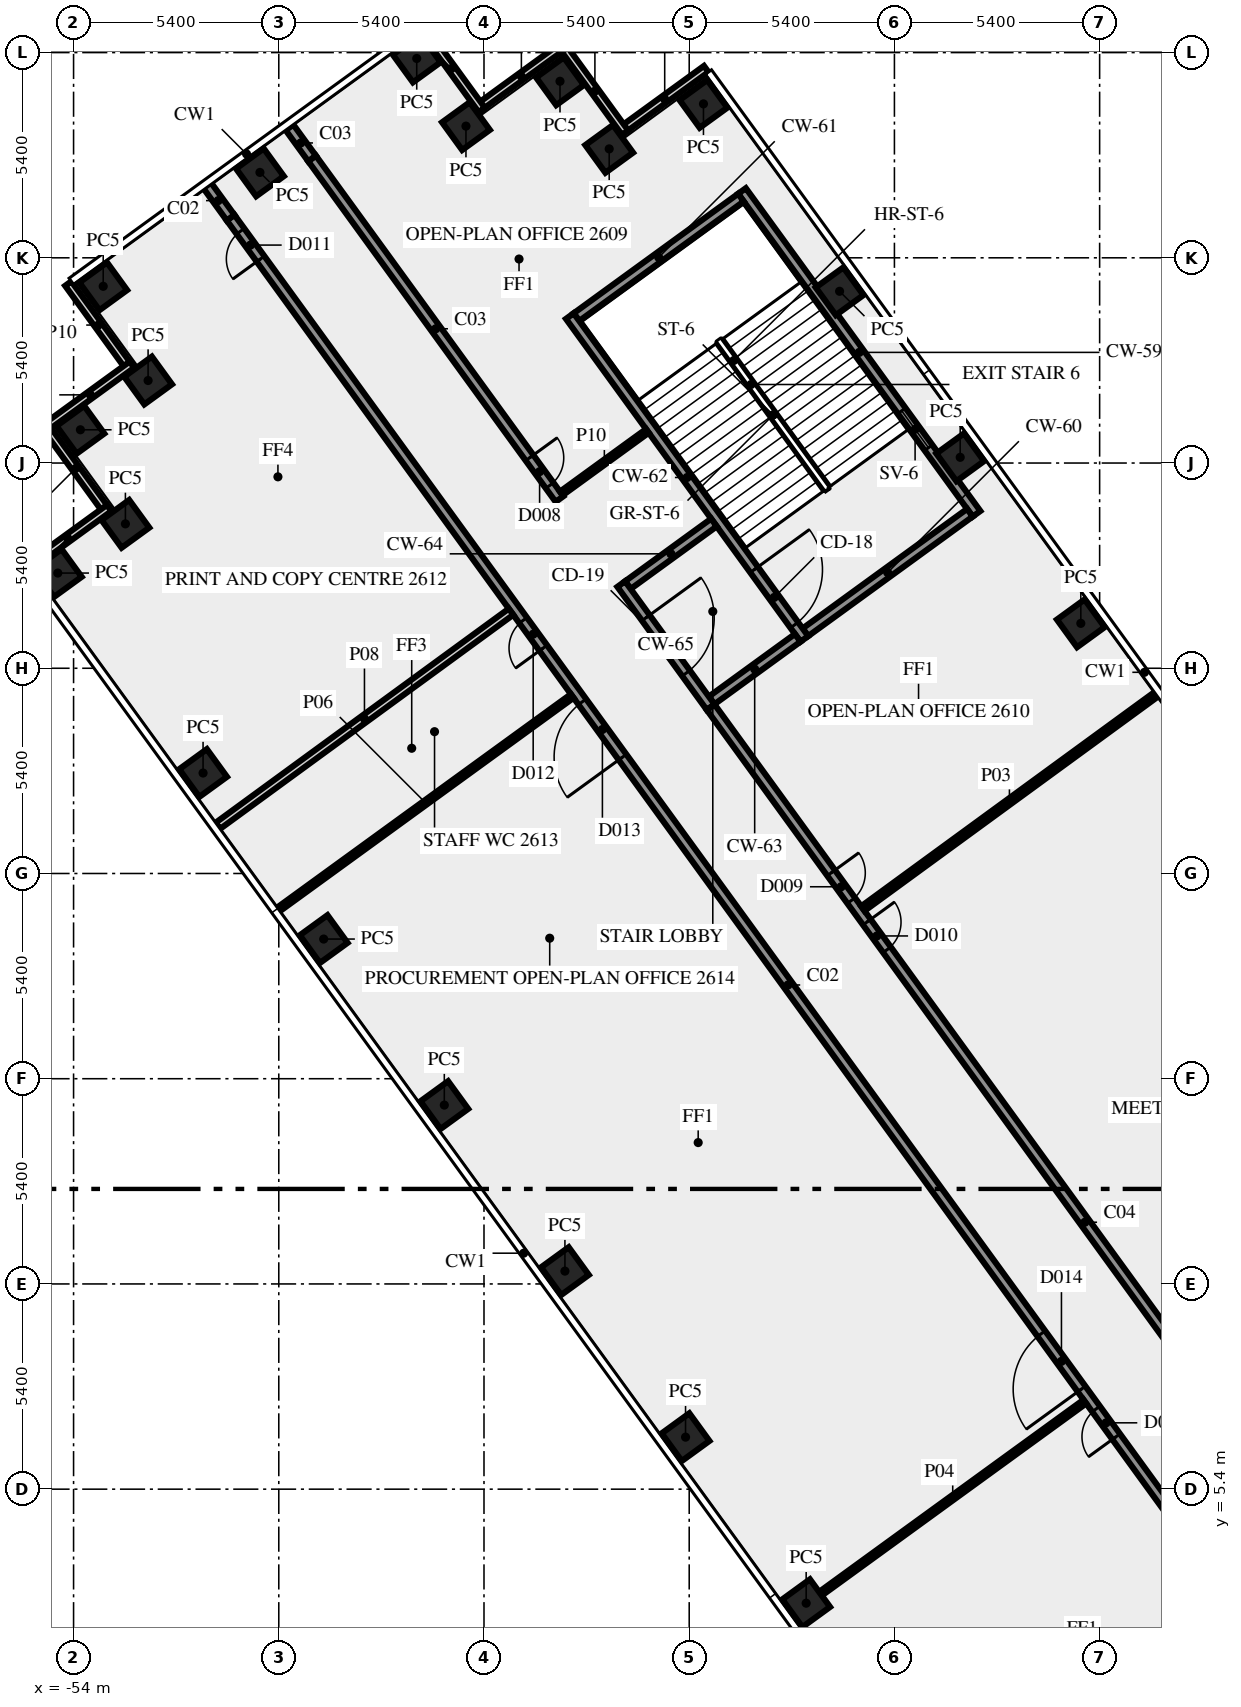
"""IFC4 building model, lengths in metres.
Left out: names, types, materials, properties, quantities, classifications, styles, units other than length and angle.
Written with IfcOpenShell. Run it as: python <this file> out.ifc"""

import sys

from ifc_helpers import new_model, si_unit, direction, frame, frame_2d, origin, origin_2d, place, context, subcontext, project, spatial, rectangle, extrude, element, fill, save


model = new_model("IFC4")
c1 = context("Model", 3, precision=1e-05, world=origin(), true_north=direction((0.0, 1.0)))
c2 = subcontext(c1, "Body", "Model", "MODEL_VIEW")
j1 = project(units=[si_unit("LENGTHUNIT", "METRE"), si_unit("PLANEANGLEUNIT", "RADIAN")], contexts=[c1])
p1 = place(None, origin())
s1 = spatial("IfcSite", under=j1, at=p1, CompositionType="ELEMENT")
p2 = place(p1, origin())
s2 = spatial("IfcBuilding", under=s1, at=p2, CompositionType="ELEMENT")
p3 = place(p2, frame((0.0, 0.0, 113.0)))
s3 = spatial("IfcBuildingStorey", under=s2, at=p3, CompositionType="ELEMENT", Elevation=113.0)
for number, where, z_axis, x_axis in (
    (1, (-27.495, 28.181, 0.0), (0.0, 0.0, 1.0), (-0.588, 0.809, 0.0)),
    (2, (-30.669, 32.55, 0.0), (0.0, 0.0, 1.0), (-0.588, 0.809, 0.0)),
    (3, (-33.843, 36.919, 0.0), (0.0, 0.0, 1.0), (-0.588, 0.809, 0.0)),
    (4, (-37.425, 41.85, 0.0), (0.0, 0.0, 1.0), (-0.588, 0.809, 0.0)),
    (5, (-39.906, 40.666, 0.0), (0.0, 0.0, 1.0), (-0.588, 0.809, 0.0)),
    (6, (-41.2, 42.445, 0.0), (0.0, 0.0, 1.0), (-0.588, 0.809, 0.0)),
    (7, (-43.675, 41.265, 0.0), (0.0, 0.0, 1.0), (-0.809, -0.588, 0.0)),
    (8, (-44.97, 43.045, 0.0), (0.0, 0.0, 1.0), (-0.809, -0.588, 0.0)),
    (9, (-49.096, 40.047, 0.0), (0.0, 0.0, 1.0), (-0.809, -0.588, 0.0)),
    (10, (-53.22, 37.05, 0.0), (0.0, 0.0, 1.0), (0.588, -0.809, 0.0)),
    (11, (-52.039, 34.571, 0.0), (0.0, 0.0, 1.0), (-0.809, -0.588, 0.0)),
    (12, (-53.82, 33.275, 0.0), (0.0, 0.0, 1.0), (0.588, -0.809, 0.0)),
    (13, (-52.636, 30.8, 0.0), (0.0, 0.0, 1.0), (-0.809, -0.588, 0.0)),
    (14, (-54.415, 29.505, 0.0), (0.0, 0.0, 1.0), (0.588, -0.809, 0.0)),
    (15, (-50.592, 24.243, 0.0), (0.0, 0.0, 1.0), (0.588, -0.809, 0.0)),
    (16, (-47.418, 19.875, 0.0), (0.0, 0.0, 1.0), (0.588, -0.809, 0.0)),
    (17, (-44.244, 15.506, 0.0), (0.0, 0.0, 1.0), (0.588, -0.809, 0.0)),
    (18, (-41.07, 11.137, 0.0), (0.0, 0.0, 1.0), (0.588, -0.809, 0.0)),
    (19, (-37.896, 6.769, 0.0), (0.0, 0.0, 1.0), (0.588, -0.809, 0.0)),
    (20, (-34.722, 2.4, 0.0), (0.0, 0.0, 1.0), (0.588, -0.809, 0.0)),
):
    element("IfcColumn", number, at=place(p3, frame(where, z_axis=z_axis, x_axis=x_axis)), inside=s3, PredefinedType="COLUMN", context=c2, shape_type="SweptSolid", body=[
        extrude(rectangle(XDim=0.9, YDim=0.9, at=origin_2d()), origin(), (0.0, 0.0, 1.0), 3.65),
    ])
p4 = place(p3, frame((-37.353, 42.768, 0.0), z_axis=(0.0, 0.0, 1.0), x_axis=(-0.809033161865, -0.587762999008, 0.0)))
e21 = element("IfcWall", 21, at=p4, inside=s3, PredefinedType="SOLIDWALL", context=c2, shape_type="SweptSolid", body=[
    extrude(rectangle(XDim=2.7, YDim=0.2, at=frame_2d((1.35, 0.0))), origin(), (0.0, 0.0, 1.0), 3.65),
])
p5 = place(p3, frame((-39.488, 41.094, 0.0), z_axis=(0.0, 0.0, 1.0), x_axis=(-0.587806000234, 0.809001919707, 0.0)))
e22 = element("IfcWall", 22, at=p5, inside=s3, PredefinedType="SOLIDWALL", context=c2, shape_type="SweptSolid", body=[
    extrude(rectangle(XDim=2.7, YDim=0.2, at=frame_2d((1.35, 0.0))), origin(), (0.0, 0.0, 1.0), 3.65),
])
for number, where, z_axis, x_axis in (
    (23, (-41.124, 43.366, 0.0), (0.0, 0.0, 1.0), (-0.809, -0.588, 0.0)),
    (24, (-43.259, 41.691, 0.0), (0.0, 0.0, 1.0), (-0.588, 0.809, 0.0)),
    (25, (-54.14, 37.123, 0.0), (0.0, 0.0, 1.0), (0.588, -0.809, 0.0)),
    (26, (-52.465, 34.987, 0.0), (0.0, 0.0, 1.0), (-0.809, -0.588, 0.0)),
):
    element("IfcWall", number, at=place(p3, frame(where, z_axis=z_axis, x_axis=x_axis)), inside=s3, PredefinedType="SOLIDWALL", context=c2, shape_type="SweptSolid", body=[
        extrude(rectangle(XDim=2.7, YDim=0.2, at=frame_2d((1.35, 0.0))), origin(), (0.0, 0.0, 1.0), 3.65),
    ])
p6 = place(p3, frame((-54.738, 33.351, 0.0), z_axis=(0.0, 0.0, 1.0), x_axis=(0.587779184282, -0.809021403008, 0.0)))
e27 = element("IfcWall", 27, at=p6, inside=s3, PredefinedType="SOLIDWALL", context=c2, shape_type="SweptSolid", body=[
    extrude(rectangle(XDim=2.7, YDim=0.2, at=frame_2d((1.35, 0.0))), origin(), (0.0, 0.0, 1.0), 3.65),
])
p7 = place(p3, frame((-53.063, 31.216, 0.0), z_axis=(0.0, 0.0, 1.0), x_axis=(-0.809033161865, -0.587762999008, 0.0)))
e28 = element("IfcWall", 28, at=p7, inside=s3, PredefinedType="SOLIDWALL", context=c2, shape_type="SweptSolid", body=[
    extrude(rectangle(XDim=2.7, YDim=0.2, at=frame_2d((1.35, 0.0))), origin(), (0.0, 0.0, 1.0), 3.65),
])
p8 = place(p3, frame((-30.24, 31.064, 0.0), z_axis=(0.0, 0.0, 1.0), x_axis=(-0.587795589702, 0.809009483706, 0.0)))
e29 = element("IfcWall", 29, at=p8, inside=s3, PredefinedType="SHEAR", context=c2, shape_type="SweptSolid", body=[
    extrude(rectangle(XDim=10.5, YDim=0.25, at=frame_2d((5.25, 0.0))), origin(), (0.0, 0.0, 1.0), 3.65),
])
p9 = place(p8, frame((2.15, 0.0, 1.0)))
e30 = element("IfcOpeningElement", 30, at=p9, cuts=e29, PredefinedType="OPENING", context=c2, shape_type="SweptSolid", body=[
    extrude(rectangle(XDim=1.2, YDim=1.2, at=frame_2d((0.6, 0.6))), frame((0.0, 0.135, 0.0), z_axis=(0.0, -1.0, 0.0), x_axis=(1.0, 0.0, 0.0)), (0.0, 0.0, 1.0), 0.27),
])
p10 = place(p3, frame((-30.414, 31.092, 0.0), z_axis=(0.0, 0.0, 1.0), x_axis=(-0.8089984606, -0.587810760999, 0.0)))
e31 = element("IfcWall", 31, at=p10, inside=s3, PredefinedType="SHEAR", context=c2, shape_type="SweptSolid", body=[
    extrude(rectangle(XDim=5.35, YDim=0.25, at=frame_2d((2.675, 0.0))), origin(), (0.0, 0.0, 1.0), 3.65),
])
p11 = place(p3, frame((-36.439, 39.384, 0.0), z_axis=(0.0, 0.0, 1.0), x_axis=(-0.809020161303, -0.587780893365, 0.0)))
e32 = element("IfcWall", 32, at=p11, inside=s3, PredefinedType="SHEAR", context=c2, shape_type="SweptSolid", body=[
    extrude(rectangle(XDim=5.35, YDim=0.25, at=frame_2d((2.675, 0.0))), origin(), (0.0, 0.0, 1.0), 3.65),
])
p12 = place(p3, frame((-40.942, 36.267, 0.0), z_axis=(0.0, 0.0, 1.0), x_axis=(0.587795589702, -0.809009483706, 0.0)))
e33 = element("IfcWall", 33, at=p12, inside=s3, PredefinedType="SHEAR", context=c2, shape_type="SweptSolid", body=[
    extrude(rectangle(XDim=10.5, YDim=0.25, at=frame_2d((5.25, 0.0))), origin(), (0.0, 0.0, 1.0), 3.65),
])
p13 = place(p12, frame((8.25, 0.0, 0.0)))
e34 = element("IfcOpeningElement", 34, at=p13, cuts=e33, PredefinedType="OPENING", context=c2, shape_type="SweptSolid", body=[
    extrude(rectangle(XDim=1.8, YDim=2.1, at=frame_2d((0.9, 1.05))), frame((0.0, 0.135, 0.0), z_axis=(0.0, -1.0, 0.0), x_axis=(1.0, 0.0, 0.0)), (0.0, 0.0, 1.0), 0.27),
])
for number, where, z_axis, x_axis in (
    (35, (-34.945, 27.8, 0.0), (0.0, 0.0, 1.0), (-0.809, -0.588, 0.0)),
    (36, (-37.149, 30.834, 0.0), (0.0, 0.0, 1.0), (-0.809, -0.588, 0.0)),
):
    element("IfcWall", number, at=place(p3, frame(where, z_axis=z_axis, x_axis=x_axis)), inside=s3, PredefinedType="SHEAR", context=c2, shape_type="SweptSolid", body=[
        extrude(rectangle(XDim=2.8, YDim=0.25, at=frame_2d((1.4, 0.0))), origin(), (0.0, 0.0, 1.0), 3.65),
    ])
p14 = place(p3, frame((-39.589, 29.216, 0.0), z_axis=(0.0, 0.0, 1.0), x_axis=(0.587772420479, -0.809026317077, 0.0)))
e37 = element("IfcWall", 37, at=p14, inside=s3, PredefinedType="SHEAR", context=c2, shape_type="SweptSolid", body=[
    extrude(rectangle(XDim=4.0, YDim=0.25, at=frame_2d((2.0, 0.0))), origin(), (0.0, 0.0, 1.0), 3.65),
])
p15 = place(p14, frame((1.1, 0.0, 0.0)))
e38 = element("IfcOpeningElement", 38, at=p15, cuts=e37, PredefinedType="OPENING", context=c2, shape_type="SweptSolid", body=[
    extrude(rectangle(XDim=1.8, YDim=2.1, at=frame_2d((0.9, 1.05))), frame((0.0, 0.135, 0.0), z_axis=(0.0, -1.0, 0.0), x_axis=(1.0, 0.0, 0.0)), (0.0, 0.0, 1.0), 0.27),
])
p16 = place(p3, frame((-20.531, -1.523, 0.0), z_axis=(0.0, 0.0, 1.0), x_axis=(-0.587784522481, 0.809017524614, 0.0)))
e39 = element("IfcWall", 39, at=p16, inside=s3, PredefinedType="SOLIDWALL", context=c2, shape_type="SweptSolid", body=[
    extrude(rectangle(XDim=49.912, YDim=0.25, at=frame_2d((24.956, 0.0))), origin(), (0.0, 0.0, 1.0), 3.65),
])
p17 = place(p16, frame((10.266, 0.0, 0.0)))
e40 = element("IfcOpeningElement", 40, at=p17, cuts=e39, PredefinedType="OPENING", context=c2, shape_type="SweptSolid", body=[
    extrude(rectangle(XDim=0.9, YDim=2.1, at=frame_2d((0.45, 1.05))), frame((0.0, 0.135, 0.0), z_axis=(0.0, -1.0, 0.0), x_axis=(1.0, 0.0, 0.0)), (0.0, 0.0, 1.0), 0.27),
])
p18 = place(p16, frame((32.366, 0.0, 0.0)))
e41 = element("IfcOpeningElement", 41, at=p18, cuts=e39, PredefinedType="OPENING", context=c2, shape_type="SweptSolid", body=[
    extrude(rectangle(XDim=1.8, YDim=2.1, at=frame_2d((0.9, 1.05))), frame((0.0, 0.135, 0.0), z_axis=(0.0, -1.0, 0.0), x_axis=(1.0, 0.0, 0.0)), (0.0, 0.0, 1.0), 0.27),
])
p19 = place(p16, frame((11.815, 0.0, 0.0)))
e42 = element("IfcOpeningElement", 42, at=p19, cuts=e39, PredefinedType="OPENING", context=c2, shape_type="SweptSolid", body=[
    extrude(rectangle(XDim=1.8, YDim=2.1, at=frame_2d((0.9, 1.05))), frame((0.0, 0.135, 0.0), z_axis=(0.0, -1.0, 0.0), x_axis=(1.0, 0.0, 0.0)), (0.0, 0.0, 1.0), 0.27),
])
p20 = place(p16, frame((48.57, 0.0, 0.0)))
e43 = element("IfcOpeningElement", 43, at=p20, cuts=e39, PredefinedType="OPENING", context=c2, shape_type="SweptSolid", body=[
    extrude(rectangle(XDim=0.9, YDim=2.1, at=frame_2d((0.45, 1.05))), frame((0.0, 0.135, 0.0), z_axis=(0.0, -1.0, 0.0), x_axis=(1.0, 0.0, 0.0)), (0.0, 0.0, 1.0), 0.27),
])
p21 = place(p16, frame((35.915, 0.0, 0.0)))
e44 = element("IfcOpeningElement", 44, at=p21, cuts=e39, PredefinedType="OPENING", context=c2, shape_type="SweptSolid", body=[
    extrude(rectangle(XDim=0.9, YDim=2.1, at=frame_2d((0.45, 1.05))), frame((0.0, 0.135, 0.0), z_axis=(0.0, -1.0, 0.0), x_axis=(1.0, 0.0, 0.0)), (0.0, 0.0, 1.0), 0.27),
])
p22 = place(p3, frame((-47.725, 40.414, 0.0), z_axis=(0.0, 0.0, 1.0), x_axis=(0.587773291021, -0.809025684612, 0.0)))
e45 = element("IfcWall", 45, at=p22, inside=s3, PredefinedType="SOLIDWALL", context=c2, shape_type="SweptSolid", body=[
    extrude(rectangle(XDim=11.079, YDim=0.25, at=frame_2d((5.539, 0.0))), origin(), (0.0, 0.0, 1.0), 3.65),
])
p23 = place(p22, frame((9.737, 0.0, 0.0)))
e46 = element("IfcOpeningElement", 46, at=p23, cuts=e45, PredefinedType="OPENING", context=c2, shape_type="SweptSolid", body=[
    extrude(rectangle(XDim=0.9, YDim=2.1, at=frame_2d((0.45, 1.05))), frame((0.0, 0.135, 0.0), z_axis=(0.0, -1.0, 0.0), x_axis=(1.0, 0.0, 0.0)), (0.0, 0.0, 1.0), 0.27),
])
p24 = place(p3, frame((-37.232, 25.972, 0.0), z_axis=(0.0, 0.0, 1.0), x_axis=(0.587786323093, -0.809016216391, 0.0)))
e47 = element("IfcWall", 47, at=p24, inside=s3, PredefinedType="SOLIDWALL", context=c2, shape_type="SweptSolid", body=[
    extrude(rectangle(XDim=33.493, YDim=0.25, at=frame_2d((16.747, 0.0))), origin(), (0.0, 0.0, 1.0), 3.65),
])
p25 = place(p24, frame((5.385, 0.0, 0.0)))
e48 = element("IfcOpeningElement", 48, at=p25, cuts=e47, PredefinedType="OPENING", context=c2, shape_type="SweptSolid", body=[
    extrude(rectangle(XDim=0.9, YDim=2.1, at=frame_2d((0.45, 1.05))), frame((0.0, 0.135, 0.0), z_axis=(0.0, -1.0, 0.0), x_axis=(1.0, 0.0, 0.0)), (0.0, 0.0, 1.0), 0.27),
])
p26 = place(p24, frame((6.985, 0.0, 0.0)))
e49 = element("IfcOpeningElement", 49, at=p26, cuts=e47, PredefinedType="OPENING", context=c2, shape_type="SweptSolid", body=[
    extrude(rectangle(XDim=0.9, YDim=2.1, at=frame_2d((0.45, 1.05))), frame((0.0, 0.135, 0.0), z_axis=(0.0, -1.0, 0.0), x_axis=(1.0, 0.0, 0.0)), (0.0, 0.0, 1.0), 0.27),
])
p27 = place(p3, frame((-33.23, 20.677, 0.0), z_axis=(0.0, 0.0, 1.0), x_axis=(0.807610282865, 0.589716568371, 0.0)))
e50 = element("IfcWall", 50, at=p27, inside=s3, PredefinedType="PARTITIONING", context=c2, shape_type="SweptSolid", body=[
    extrude(rectangle(XDim=9.55, YDim=0.15, at=frame_2d((4.775, 0.0))), origin(), (0.0, 0.0, 1.0), 2.75),
])
p28 = place(p3, frame((-27.389, 7.703, 0.0), z_axis=(0.0, 0.0, 1.0), x_axis=(-0.809052894195, -0.587735837256, 0.0)))
e51 = element("IfcWall", 51, at=p28, inside=s3, PredefinedType="PARTITIONING", context=c2, shape_type="SweptSolid", body=[
    extrude(rectangle(XDim=8.594, YDim=0.12, at=frame_2d((4.297, 0.0))), origin(), (0.0, 0.0, 1.0), 3.65),
])
p29 = place(p3, frame((-40.878, 26.27, 0.0), z_axis=(0.0, 0.0, 1.0), x_axis=(-0.809102944047, -0.587666934526, 0.0)))
e52 = element("IfcWall", 52, at=p29, inside=s3, PredefinedType="PARTITIONING", context=c2, shape_type="SweptSolid", body=[
    extrude(rectangle(XDim=9.55, YDim=0.12, at=frame_2d((4.775, 0.0))), origin(), (0.0, 0.0, 1.0), 2.75),
])
p30 = place(p3, frame((-50.202, 22.855, 0.0), z_axis=(0.0, 0.0, 1.0), x_axis=(0.807642555839, 0.589672368352, 0.0)))
e53 = element("IfcWall", 53, at=p30, inside=s3, PredefinedType="SOLIDWALL", context=c2, shape_type="SweptSolid", body=[
    extrude(rectangle(XDim=9.551, YDim=0.2, at=frame_2d((4.775, 0.0))), origin(), (0.0, 0.0, 1.0), 2.75),
])
p31 = place(p3, frame((-41.166, 31.599, 0.0), z_axis=(0.0, 0.0, 1.0), x_axis=(0.809090262332, 0.587684394381, 0.0)))
e54 = element("IfcWall", 54, at=p31, inside=s3, PredefinedType="PARTITIONING", context=c2, shape_type="SweptSolid", body=[
    extrude(rectangle(XDim=2.801, YDim=0.12, at=frame_2d((1.4, 0.0))), origin(), (0.0, 0.0, 1.0), 3.65),
])
p32 = place(p3, frame((-49.869, 38.856, 0.0), z_axis=(0.0, 0.0, 1.0), x_axis=(-0.587674273289, 0.809097613712, 0.0)))
e55 = element("IfcWall", 55, at=p32, inside=s3, PredefinedType="SOLIDWALL", context=c2, shape_type="SweptSolid", body=[
    extrude(rectangle(XDim=1.109, YDim=0.25, at=frame_2d((0.555, 0.0))), origin(), (0.0, 0.0, 1.0), 2.75),
])
p33 = place(p3, frame((-47.725, 40.414, 0.0), z_axis=(0.0, 0.0, 1.0), x_axis=(-0.587840411638, 0.808976915892, 0.0)))
e56 = element("IfcWall", 56, at=p33, inside=s3, PredefinedType="SOLIDWALL", context=c2, shape_type="SweptSolid", body=[
    extrude(rectangle(XDim=1.008, YDim=0.25, at=frame_2d((0.504, 0.0))), origin(), (0.0, 0.0, 1.0), 2.75),
])
p34 = place(p9, origin())
e57 = element("IfcWindow", 57, at=p34, inside=s3, PartitioningType="SINGLE_PANEL", PredefinedType="WINDOW", context=c2, shape_type="SweptSolid", body=[
    extrude(rectangle(XDim=1.2, YDim=1.2, at=frame_2d((0.6, 0.6))), frame((0.0, 0.03, 0.0), z_axis=(0.0, -1.0, 0.0), x_axis=(1.0, 0.0, 0.0)), (0.0, 0.0, 1.0), 0.06),
])
fill(e30, e57)
p35 = place(p13, origin())
e58 = element("IfcDoor", 58, at=p35, inside=s3, OperationType="DOUBLE_DOOR_SINGLE_SWING", PredefinedType="DOOR", context=c2, shape_type="SweptSolid", body=[
    extrude(rectangle(XDim=1.8, YDim=2.1, at=frame_2d((0.9, 1.05))), frame((0.0, 0.025, 0.0), z_axis=(0.0, -1.0, 0.0), x_axis=(1.0, 0.0, 0.0)), (0.0, 0.0, 1.0), 0.05),
])
fill(e34, e58)
p36 = place(p15, origin())
e59 = element("IfcDoor", 59, at=p36, inside=s3, OperationType="DOUBLE_DOOR_SINGLE_SWING", PredefinedType="DOOR", context=c2, shape_type="SweptSolid", body=[
    extrude(rectangle(XDim=1.8, YDim=2.1, at=frame_2d((0.9, 1.05))), frame((0.0, 0.025, 0.0), z_axis=(0.0, -1.0, 0.0), x_axis=(1.0, 0.0, 0.0)), (0.0, 0.0, 1.0), 0.05),
])
fill(e38, e59)
p37 = place(p23, origin())
e60 = element("IfcDoor", 60, at=p37, inside=s3, OperationType="SINGLE_SWING_RIGHT", PredefinedType="DOOR", context=c2, shape_type="SweptSolid", body=[
    extrude(rectangle(XDim=0.9, YDim=2.1, at=frame_2d((0.45, 1.05))), frame((0.0, 0.025, 0.0), z_axis=(0.0, -1.0, 0.0), x_axis=(1.0, 0.0, 0.0)), (0.0, 0.0, 1.0), 0.05),
])
fill(e46, e60)
p38 = place(p25, origin())
e61 = element("IfcDoor", 61, at=p38, inside=s3, OperationType="SINGLE_SWING_RIGHT", PredefinedType="DOOR", context=c2, shape_type="SweptSolid", body=[
    extrude(rectangle(XDim=0.9, YDim=2.1, at=frame_2d((0.45, 1.05))), frame((0.0, 0.025, 0.0), z_axis=(0.0, -1.0, 0.0), x_axis=(1.0, 0.0, 0.0)), (0.0, 0.0, 1.0), 0.05),
])
fill(e48, e61)
p39 = place(p17, origin())
e62 = element("IfcDoor", 62, at=p39, inside=s3, OperationType="SINGLE_SWING_RIGHT", PredefinedType="DOOR", context=c2, shape_type="SweptSolid", body=[
    extrude(rectangle(XDim=0.9, YDim=2.1, at=frame_2d((0.45, 1.05))), frame((0.0, 0.025, 0.0), z_axis=(0.0, -1.0, 0.0), x_axis=(1.0, 0.0, 0.0)), (0.0, 0.0, 1.0), 0.05),
])
fill(e40, e62)
p40 = place(p26, origin())
e63 = element("IfcDoor", 63, at=p40, inside=s3, OperationType="SINGLE_SWING_LEFT", PredefinedType="DOOR", context=c2, shape_type="SweptSolid", body=[
    extrude(rectangle(XDim=0.9, YDim=2.1, at=frame_2d((0.45, 1.05))), frame((0.0, 0.025, 0.0), z_axis=(0.0, -1.0, 0.0), x_axis=(1.0, 0.0, 0.0)), (0.0, 0.0, 1.0), 0.05),
])
fill(e49, e63)
p41 = place(p18, origin())
e64 = element("IfcDoor", 64, at=p41, inside=s3, OperationType="DOUBLE_DOOR_SINGLE_SWING", PredefinedType="DOOR", context=c2, shape_type="SweptSolid", body=[
    extrude(rectangle(XDim=1.8, YDim=2.1, at=frame_2d((0.9, 1.05))), frame((0.0, 0.025, 0.0), z_axis=(0.0, -1.0, 0.0), x_axis=(1.0, 0.0, 0.0)), (0.0, 0.0, 1.0), 0.05),
])
fill(e41, e64)
p42 = place(p19, origin())
e65 = element("IfcDoor", 65, at=p42, inside=s3, OperationType="DOUBLE_DOOR_SINGLE_SWING", PredefinedType="DOOR", context=c2, shape_type="SweptSolid", body=[
    extrude(rectangle(XDim=1.8, YDim=2.1, at=frame_2d((0.9, 1.05))), frame((0.0, 0.025, 0.0), z_axis=(0.0, -1.0, 0.0), x_axis=(1.0, 0.0, 0.0)), (0.0, 0.0, 1.0), 0.05),
])
fill(e42, e65)
p43 = place(p20, origin())
e66 = element("IfcDoor", 66, at=p43, inside=s3, OperationType="SINGLE_SWING_RIGHT", PredefinedType="DOOR", context=c2, shape_type="SweptSolid", body=[
    extrude(rectangle(XDim=0.9, YDim=2.1, at=frame_2d((0.45, 1.05))), frame((0.0, 0.025, 0.0), z_axis=(0.0, -1.0, 0.0), x_axis=(1.0, 0.0, 0.0)), (0.0, 0.0, 1.0), 0.05),
])
fill(e43, e66)
p44 = place(p21, origin())
e67 = element("IfcDoor", 67, at=p44, inside=s3, OperationType="SINGLE_SWING_RIGHT", PredefinedType="DOOR", context=c2, shape_type="SweptSolid", body=[
    extrude(rectangle(XDim=0.9, YDim=2.1, at=frame_2d((0.45, 1.05))), frame((0.0, 0.025, 0.0), z_axis=(0.0, -1.0, 0.0), x_axis=(1.0, 0.0, 0.0)), (0.0, 0.0, 1.0), 0.05),
])
fill(e44, e67)
save(model, sys.argv[1])
